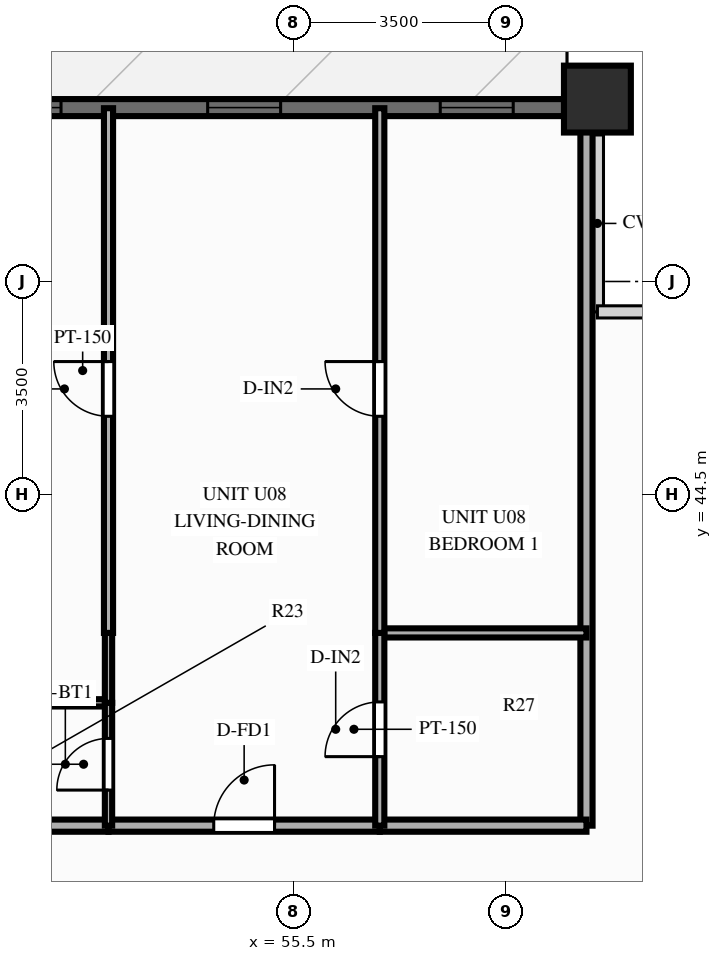
"""IFC4 building model, lengths in metres.
Left out: names, types, materials, properties, quantities, classifications, styles, units other than length and angle.
Written with IfcOpenShell. Run it as: python <this file> out.ifc"""

import sys

from ifc_helpers import new_model, si_unit, direction, frame, frame_2d, origin, origin_2d, place, context, subcontext, project, spatial, rectangle, extrude, source, transform, mapped, element, fill, save


model = new_model("IFC4")
c1 = context("Model", 3, precision=1e-05, world=origin(), true_north=direction((0.0, 1.0)))
c2 = subcontext(c1, "Body", "Model", "MODEL_VIEW")
j1 = project(units=[si_unit("LENGTHUNIT", "METRE"), si_unit("PLANEANGLEUNIT", "RADIAN")], contexts=[c1])
p1 = place(None, origin())
s1 = spatial("IfcSite", under=j1, at=p1, CompositionType="ELEMENT")
p2 = place(p1, origin())
s2 = spatial("IfcBuilding", under=s1, at=p2, CompositionType="ELEMENT")
p3 = place(p2, frame((0.0, 0.0, 34.4)))
s3 = spatial("IfcBuildingStorey", under=s2, at=p3, CompositionType="ELEMENT", Elevation=34.4)
m1 = source(origin(), c2, "Body", "SweptSolid", [
    extrude(rectangle(XDim=1.1, YDim=1.1, at=origin_2d()), origin(), (0.0, 0.0, 1.0), 3.0),
])
p4 = place(p3, frame((60.5, 51.0, 0.0), z_axis=(0.0, 0.0, 1.0), x_axis=(1.0, 0.0, 0.0)))
e1 = element("IfcColumn", 1, at=p4, inside=s3, PredefinedType="COLUMN", context=c2, shape_type="MappedRepresentation", body=[
    mapped(m1, transform((0.0, 0.0, 0.0), scale=1.0)),
])
p5 = place(p3, frame((15.5, 50.86, 0.0), z_axis=(0.0, 0.0, 1.0), x_axis=(1.0, 0.0, 0.0)))
e2 = element("IfcWall", 2, at=p5, inside=s3, PredefinedType="SOLIDWALL", context=c2, shape_type="SweptSolid", body=[
    extrude(rectangle(XDim=45.0, YDim=0.28, at=frame_2d((22.5, 0.0))), origin(), (0.0, 0.0, 1.0), 2.28),
])
p6 = place(p5, frame((0.76, 0.0, 0.25)))
e3 = element("IfcOpeningElement", 3, at=p6, cuts=e2, PredefinedType="OPENING", context=c2, shape_type="SweptSolid", body=[
    extrude(rectangle(XDim=1.2, YDim=1.5, at=frame_2d((0.6, 0.75))), frame((0.0, 0.152, 0.0), z_axis=(0.0, -1.0, 0.0), x_axis=(1.0, 0.0, 0.0)), (0.0, 0.0, 1.0), 0.304),
])
p7 = place(p5, frame((3.111, 0.0, 0.25)))
e4 = element("IfcOpeningElement", 4, at=p7, cuts=e2, PredefinedType="OPENING", context=c2, shape_type="SweptSolid", body=[
    extrude(rectangle(XDim=1.2, YDim=1.5, at=frame_2d((0.6, 0.75))), frame((0.0, 0.152, 0.0), z_axis=(0.0, -1.0, 0.0), x_axis=(1.0, 0.0, 0.0)), (0.0, 0.0, 1.0), 0.304),
])
p8 = place(p5, frame((6.723, 0.0, 0.25)))
e5 = element("IfcOpeningElement", 5, at=p8, cuts=e2, PredefinedType="OPENING", context=c2, shape_type="SweptSolid", body=[
    extrude(rectangle(XDim=1.2, YDim=1.5, at=frame_2d((0.6, 0.75))), frame((0.0, 0.152, 0.0), z_axis=(0.0, -1.0, 0.0), x_axis=(1.0, 0.0, 0.0)), (0.0, 0.0, 1.0), 0.304),
])
p9 = place(p5, frame((10.653, 0.0, 0.25)))
e6 = element("IfcOpeningElement", 6, at=p9, cuts=e2, PredefinedType="OPENING", context=c2, shape_type="SweptSolid", body=[
    extrude(rectangle(XDim=1.2, YDim=1.5, at=frame_2d((0.6, 0.75))), frame((0.0, 0.152, 0.0), z_axis=(0.0, -1.0, 0.0), x_axis=(1.0, 0.0, 0.0)), (0.0, 0.0, 1.0), 0.304),
])
p10 = place(p5, frame((13.681, 0.0, 0.25)))
e7 = element("IfcOpeningElement", 7, at=p10, cuts=e2, PredefinedType="OPENING", context=c2, shape_type="SweptSolid", body=[
    extrude(rectangle(XDim=1.2, YDim=1.5, at=frame_2d((0.6, 0.75))), frame((0.0, 0.152, 0.0), z_axis=(0.0, -1.0, 0.0), x_axis=(1.0, 0.0, 0.0)), (0.0, 0.0, 1.0), 0.304),
])
p11 = place(p5, frame((17.683, 0.0, 0.25)))
e8 = element("IfcOpeningElement", 8, at=p11, cuts=e2, PredefinedType="OPENING", context=c2, shape_type="SweptSolid", body=[
    extrude(rectangle(XDim=1.2, YDim=1.5, at=frame_2d((0.6, 0.75))), frame((0.0, 0.152, 0.0), z_axis=(0.0, -1.0, 0.0), x_axis=(1.0, 0.0, 0.0)), (0.0, 0.0, 1.0), 0.304),
])
p12 = place(p5, frame((21.325, 0.0, 0.0)))
e9 = element("IfcOpeningElement", 9, at=p12, cuts=e2, PredefinedType="OPENING", context=c2, shape_type="SweptSolid", body=[
    extrude(rectangle(XDim=1.1, YDim=2.15, at=frame_2d((0.55, 1.075))), frame((0.0, 0.152, 0.0), z_axis=(0.0, -1.0, 0.0), x_axis=(1.0, 0.0, 0.0)), (0.0, 0.0, 1.0), 0.304),
])
p13 = place(p5, frame((24.356, 0.0, 0.25)))
e10 = element("IfcOpeningElement", 10, at=p13, cuts=e2, PredefinedType="OPENING", context=c2, shape_type="SweptSolid", body=[
    extrude(rectangle(XDim=1.2, YDim=1.5, at=frame_2d((0.6, 0.75))), frame((0.0, 0.152, 0.0), z_axis=(0.0, -1.0, 0.0), x_axis=(1.0, 0.0, 0.0)), (0.0, 0.0, 1.0), 0.304),
])
p14 = place(p5, frame((26.873, 0.0, 0.25)))
e11 = element("IfcOpeningElement", 11, at=p14, cuts=e2, PredefinedType="OPENING", context=c2, shape_type="SweptSolid", body=[
    extrude(rectangle(XDim=1.2, YDim=1.5, at=frame_2d((0.6, 0.75))), frame((0.0, 0.152, 0.0), z_axis=(0.0, -1.0, 0.0), x_axis=(1.0, 0.0, 0.0)), (0.0, 0.0, 1.0), 0.304),
])
p15 = place(p5, frame((29.744, 0.0, 0.25)))
e12 = element("IfcOpeningElement", 12, at=p15, cuts=e2, PredefinedType="OPENING", context=c2, shape_type="SweptSolid", body=[
    extrude(rectangle(XDim=0.7, YDim=1.5, at=frame_2d((0.35, 0.75))), frame((0.0, 0.152, 0.0), z_axis=(0.0, -1.0, 0.0), x_axis=(1.0, 0.0, 0.0)), (0.0, 0.0, 1.0), 0.304),
])
p16 = place(p5, frame((31.898, 0.0, 0.25)))
e13 = element("IfcOpeningElement", 13, at=p16, cuts=e2, PredefinedType="OPENING", context=c2, shape_type="SweptSolid", body=[
    extrude(rectangle(XDim=1.2, YDim=1.5, at=frame_2d((0.6, 0.75))), frame((0.0, 0.152, 0.0), z_axis=(0.0, -1.0, 0.0), x_axis=(1.0, 0.0, 0.0)), (0.0, 0.0, 1.0), 0.304),
])
p17 = place(p5, frame((34.979, 0.0, 0.25)))
e14 = element("IfcOpeningElement", 14, at=p17, cuts=e2, PredefinedType="OPENING", context=c2, shape_type="SweptSolid", body=[
    extrude(rectangle(XDim=1.2, YDim=1.5, at=frame_2d((0.6, 0.75))), frame((0.0, 0.152, 0.0), z_axis=(0.0, -1.0, 0.0), x_axis=(1.0, 0.0, 0.0)), (0.0, 0.0, 1.0), 0.304),
])
p18 = place(p5, frame((38.59, 0.0, 0.25)))
e15 = element("IfcOpeningElement", 15, at=p18, cuts=e2, PredefinedType="OPENING", context=c2, shape_type="SweptSolid", body=[
    extrude(rectangle(XDim=1.2, YDim=1.5, at=frame_2d((0.6, 0.75))), frame((0.0, 0.152, 0.0), z_axis=(0.0, -1.0, 0.0), x_axis=(1.0, 0.0, 0.0)), (0.0, 0.0, 1.0), 0.304),
])
p19 = place(p5, frame((42.415, 0.0, 0.25)))
e16 = element("IfcOpeningElement", 16, at=p19, cuts=e2, PredefinedType="OPENING", context=c2, shape_type="SweptSolid", body=[
    extrude(rectangle(XDim=1.2, YDim=1.5, at=frame_2d((0.6, 0.75))), frame((0.0, 0.152, 0.0), z_axis=(0.0, -1.0, 0.0), x_axis=(1.0, 0.0, 0.0)), (0.0, 0.0, 1.0), 0.304),
])
p20 = place(p3, frame((60.32, 39.05, 0.0), z_axis=(0.0, 0.0, 1.0), x_axis=(0.0, 1.0, 0.0)))
e17 = element("IfcWall", 17, at=p20, inside=s3, PredefinedType="PARTITIONING", context=c2, shape_type="SweptSolid", body=[
    extrude(rectangle(XDim=11.8, YDim=0.2, at=frame_2d((5.9, 0.0))), origin(), (0.0, 0.0, 1.0), 2.79),
])
p21 = place(p3, frame((49.698, 39.05, 0.0), z_axis=(0.0, 0.0, 1.0), x_axis=(1.0, 0.0, 0.0)))
e18 = element("IfcWall", 18, at=p21, inside=s3, PredefinedType="PARTITIONING", context=c2, shape_type="SweptSolid", body=[
    extrude(rectangle(XDim=2.762, YDim=0.2, at=frame_2d((1.381, 0.0))), origin(), (0.0, 0.0, 1.0), 2.79),
])
p22 = place(p3, frame((52.459, 39.05, 0.0), z_axis=(0.0, 0.0, 1.0), x_axis=(1.0, 0.0, 0.0)))
e19 = element("IfcWall", 19, at=p22, inside=s3, PredefinedType="PARTITIONING", context=c2, shape_type="SweptSolid", body=[
    extrude(rectangle(XDim=4.461, YDim=0.2, at=frame_2d((2.231, 0.0))), origin(), (0.0, 0.0, 1.0), 2.79),
])
p23 = place(p22, frame((1.731, 0.0, 0.0)))
e20 = element("IfcOpeningElement", 20, at=p23, cuts=e19, PredefinedType="OPENING", context=c2, shape_type="SweptSolid", body=[
    extrude(rectangle(XDim=1.0, YDim=2.15, at=frame_2d((0.5, 1.075))), frame((0.0, 0.112, 0.0), z_axis=(0.0, -1.0, 0.0), x_axis=(1.0, 0.0, 0.0)), (0.0, 0.0, 1.0), 0.224),
])
p24 = place(p3, frame((56.921, 39.05, 0.0), z_axis=(0.0, 0.0, 1.0), x_axis=(1.0, 0.0, 0.0)))
e21 = element("IfcWall", 21, at=p24, inside=s3, PredefinedType="PARTITIONING", context=c2, shape_type="SweptSolid", body=[
    extrude(rectangle(XDim=3.399, YDim=0.2, at=frame_2d((1.7, 0.0))), origin(), (0.0, 0.0, 1.0), 2.79),
])
p25 = place(p3, frame((49.698, 41.07, 0.0), z_axis=(0.0, 0.0, 1.0), x_axis=(1.0, 0.0, 0.0)))
e22 = element("IfcWall", 22, at=p25, inside=s3, PredefinedType="PARTITIONING", context=c2, shape_type="SweptSolid", body=[
    extrude(rectangle(XDim=2.762, YDim=0.12, at=frame_2d((1.381, 0.0))), origin(), (0.0, 0.0, 1.0), 2.79),
])
p26 = place(p3, frame((56.921, 42.22, 0.0), z_axis=(0.0, 0.0, 1.0), x_axis=(1.0, 0.0, 0.0)))
e23 = element("IfcWall", 23, at=p26, inside=s3, PredefinedType="PARTITIONING", context=c2, shape_type="SweptSolid", body=[
    extrude(rectangle(XDim=3.399, YDim=0.15, at=frame_2d((1.7, 0.0))), origin(), (0.0, 0.0, 1.0), 2.79),
])
p27 = place(p3, frame((52.459, 39.05, 0.0), z_axis=(0.0, 0.0, 1.0), x_axis=(0.0, 1.0, 0.0)))
e24 = element("IfcWall", 24, at=p27, inside=s3, PredefinedType="PARTITIONING", context=c2, shape_type="SweptSolid", body=[
    extrude(rectangle(XDim=2.02, YDim=0.12, at=frame_2d((1.01, 0.0))), origin(), (0.0, 0.0, 1.0), 2.79),
])
p28 = place(p27, frame((0.585, 0.0, 0.0)))
e25 = element("IfcOpeningElement", 25, at=p28, cuts=e24, PredefinedType="OPENING", context=c2, shape_type="SweptSolid", body=[
    extrude(rectangle(XDim=0.85, YDim=2.05, at=frame_2d((0.425, 1.025))), frame((0.0, 0.072, 0.0), z_axis=(0.0, -1.0, 0.0), x_axis=(1.0, 0.0, 0.0)), (0.0, 0.0, 1.0), 0.144),
])
p29 = place(p3, frame((52.459, 41.07, 0.0), z_axis=(0.0, 0.0, 1.0), x_axis=(0.0, 1.0, 0.0)))
e26 = element("IfcWall", 26, at=p29, inside=s3, PredefinedType="PARTITIONING", context=c2, shape_type="SweptSolid", body=[
    extrude(rectangle(XDim=1.15, YDim=0.12, at=frame_2d((0.575, 0.0))), origin(), (0.0, 0.0, 1.0), 2.79),
])
p30 = place(p3, frame((52.459, 42.22, 0.0), z_axis=(0.0, 0.0, 1.0), x_axis=(0.0, 1.0, 0.0)))
e27 = element("IfcWall", 27, at=p30, inside=s3, PredefinedType="PARTITIONING", context=c2, shape_type="SweptSolid", body=[
    extrude(rectangle(XDim=8.63, YDim=0.15, at=frame_2d((4.315, 0.0))), origin(), (0.0, 0.0, 1.0), 2.79),
])
p31 = place(p30, frame((3.563, 0.0, 0.0)))
e28 = element("IfcOpeningElement", 28, at=p31, cuts=e27, PredefinedType="OPENING", context=c2, shape_type="SweptSolid", body=[
    extrude(rectangle(XDim=0.9, YDim=2.1, at=frame_2d((0.45, 1.05))), frame((0.0, 0.087, 0.0), z_axis=(0.0, -1.0, 0.0), x_axis=(1.0, 0.0, 0.0)), (0.0, 0.0, 1.0), 0.174),
])
p32 = place(p3, frame((56.921, 39.05, 0.0), z_axis=(0.0, 0.0, 1.0), x_axis=(0.0, 1.0, 0.0)))
e29 = element("IfcWall", 29, at=p32, inside=s3, PredefinedType="PARTITIONING", context=c2, shape_type="SweptSolid", body=[
    extrude(rectangle(XDim=3.17, YDim=0.15, at=frame_2d((1.585, 0.0))), origin(), (0.0, 0.0, 1.0), 2.79),
])
p33 = place(p32, frame((1.135, 0.0, 0.0)))
e30 = element("IfcOpeningElement", 30, at=p33, cuts=e29, PredefinedType="OPENING", context=c2, shape_type="SweptSolid", body=[
    extrude(rectangle(XDim=0.9, YDim=2.1, at=frame_2d((0.45, 1.05))), frame((0.0, 0.087, 0.0), z_axis=(0.0, -1.0, 0.0), x_axis=(1.0, 0.0, 0.0)), (0.0, 0.0, 1.0), 0.174),
])
p34 = place(p3, frame((56.921, 42.22, 0.0), z_axis=(0.0, 0.0, 1.0), x_axis=(0.0, 1.0, 0.0)))
e31 = element("IfcWall", 31, at=p34, inside=s3, PredefinedType="PARTITIONING", context=c2, shape_type="SweptSolid", body=[
    extrude(rectangle(XDim=8.63, YDim=0.15, at=frame_2d((4.315, 0.0))), origin(), (0.0, 0.0, 1.0), 2.79),
])
p35 = place(p34, frame((3.563, 0.0, 0.0)))
e32 = element("IfcOpeningElement", 32, at=p35, cuts=e31, PredefinedType="OPENING", context=c2, shape_type="SweptSolid", body=[
    extrude(rectangle(XDim=0.9, YDim=2.1, at=frame_2d((0.45, 1.05))), frame((0.0, 0.087, 0.0), z_axis=(0.0, -1.0, 0.0), x_axis=(1.0, 0.0, 0.0)), (0.0, 0.0, 1.0), 0.174),
])
m2 = source(origin(), c2, "Body", "SweptSolid", [
    extrude(rectangle(XDim=1.2, YDim=1.5, at=frame_2d((0.6, 0.75))), frame((0.0, 0.03, 0.0), z_axis=(0.0, -1.0, 0.0), x_axis=(1.0, 0.0, 0.0)), (0.0, 0.0, 1.0), 0.06),
])
p36 = place(p17, origin())
e33 = element("IfcWindow", 33, at=p36, inside=s3, PartitioningType="SINGLE_PANEL", PredefinedType="WINDOW", context=c2, shape_type="MappedRepresentation", body=[
    mapped(m2, transform((0.0, 0.0, 0.0), scale=1.0)),
])
fill(e14, e33)
p37 = place(p18, origin())
e34 = element("IfcWindow", 34, at=p37, inside=s3, PartitioningType="SINGLE_PANEL", PredefinedType="WINDOW", context=c2, shape_type="MappedRepresentation", body=[
    mapped(m2, transform((0.0, 0.0, 0.0), scale=1.0)),
])
fill(e15, e34)
p38 = place(p19, origin())
e35 = element("IfcWindow", 35, at=p38, inside=s3, PartitioningType="SINGLE_PANEL", PredefinedType="WINDOW", context=c2, shape_type="MappedRepresentation", body=[
    mapped(m2, transform((0.0, 0.0, 0.0), scale=1.0)),
])
fill(e16, e35)
m3 = source(origin(), c2, "Body", "SweptSolid", [
    extrude(rectangle(XDim=1.0, YDim=2.15, at=frame_2d((0.5, 1.075))), frame((0.0, 0.025, 0.0), z_axis=(0.0, -1.0, 0.0), x_axis=(1.0, 0.0, 0.0)), (0.0, 0.0, 1.0), 0.05),
])
p39 = place(p23, origin())
e36 = element("IfcDoor", 36, at=p39, inside=s3, OperationType="SINGLE_SWING_RIGHT", PredefinedType="DOOR", context=c2, shape_type="MappedRepresentation", body=[
    mapped(m3, transform((0.0, 0.0, 0.0), scale=1.0)),
])
fill(e20, e36)
m4 = source(origin(), c2, "Body", "SweptSolid", [
    extrude(rectangle(XDim=0.85, YDim=2.05, at=frame_2d((0.425, 1.025))), frame((0.0, 0.025, 0.0), z_axis=(0.0, -1.0, 0.0), x_axis=(1.0, 0.0, 0.0)), (0.0, 0.0, 1.0), 0.05),
])
p40 = place(p28, origin())
e37 = element("IfcDoor", 37, at=p40, inside=s3, OperationType="SINGLE_SWING_LEFT", PredefinedType="DOOR", context=c2, shape_type="MappedRepresentation", body=[
    mapped(m4, transform((0.0, 0.0, 0.0), scale=1.0)),
])
fill(e25, e37)
m5 = source(origin(), c2, "Body", "SweptSolid", [
    extrude(rectangle(XDim=0.9, YDim=2.1, at=frame_2d((0.45, 1.05))), frame((0.0, 0.025, 0.0), z_axis=(0.0, -1.0, 0.0), x_axis=(1.0, 0.0, 0.0)), (0.0, 0.0, 1.0), 0.05),
])
p41 = place(p31, origin())
e38 = element("IfcDoor", 38, at=p41, inside=s3, OperationType="SINGLE_SWING_RIGHT", PredefinedType="DOOR", context=c2, shape_type="MappedRepresentation", body=[
    mapped(m5, transform((0.0, 0.0, 0.0), scale=1.0)),
])
fill(e28, e38)
p42 = place(p33, origin())
e39 = element("IfcDoor", 39, at=p42, inside=s3, OperationType="SINGLE_SWING_LEFT", PredefinedType="DOOR", context=c2, shape_type="MappedRepresentation", body=[
    mapped(m5, transform((0.0, 0.0, 0.0), scale=1.0)),
])
fill(e30, e39)
p43 = place(p35, origin())
e40 = element("IfcDoor", 40, at=p43, inside=s3, OperationType="SINGLE_SWING_RIGHT", PredefinedType="DOOR", context=c2, shape_type="MappedRepresentation", body=[
    mapped(m5, transform((0.0, 0.0, 0.0), scale=1.0)),
])
fill(e32, e40)
save(model, sys.argv[1])
